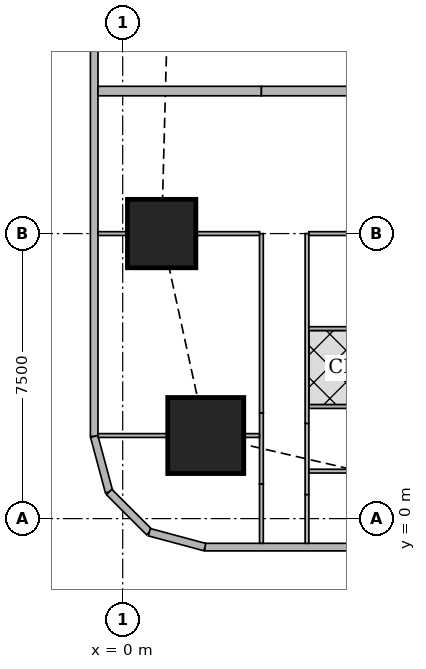
"""IFC4 building model, lengths in metres.
Left out: names, types, materials, properties, quantities, classifications, styles, units other than length and angle.
Written with IfcOpenShell. Run it as: python <this file> out.ifc"""

import sys

from ifc_helpers import new_model, si_unit, direction, frame, frame_2d, origin, origin_2d, place, context, subcontext, project, spatial, rectangle, extrude, element, fill, save


model = new_model("IFC4")
c1 = context("Model", 3, precision=1e-05, world=origin(), true_north=direction((0.0, 1.0)))
c2 = subcontext(c1, "Body", "Model", "MODEL_VIEW")
j1 = project(units=[si_unit("LENGTHUNIT", "METRE"), si_unit("PLANEANGLEUNIT", "RADIAN")], contexts=[c1])
p1 = place(None, origin())
s1 = spatial("IfcSite", under=j1, at=p1, CompositionType="ELEMENT")
p2 = place(p1, origin())
s2 = spatial("IfcBuilding", under=s1, at=p2, CompositionType="ELEMENT")
p3 = place(p2, frame((0.0, 0.0, 158.3)))
s3 = spatial("IfcBuildingStorey", under=s2, at=p3, CompositionType="ELEMENT", Elevation=158.3)
p4 = place(p3, frame((2.186, 2.186, 0.0), z_axis=(0.0, 0.0, 1.0), x_axis=(1.0, 0.0, 0.0)))
e1 = element("IfcColumn", 1, at=p4, inside=s3, PredefinedType="COLUMN", context=c2, shape_type="SweptSolid", body=[
    extrude(rectangle(XDim=2.0, YDim=2.0, at=origin_2d()), origin(), (0.0, 0.0, 1.0), 3.75),
])
p5 = place(p3, frame((1.025, 7.5, 0.0), z_axis=(0.0, 0.0, 1.0), x_axis=(1.0, 0.0, 0.0)))
e2 = element("IfcColumn", 2, at=p5, inside=s3, PredefinedType="COLUMN", context=c2, shape_type="SweptSolid", body=[
    extrude(rectangle(XDim=1.8, YDim=1.8, at=origin_2d()), origin(), (0.0, 0.0, 1.0), 3.75),
])
p6 = place(p3, frame((2.163, -0.75, 0.0), z_axis=(0.0, 0.0, 1.0), x_axis=(1.0, 0.0, 0.0)))
e3 = element("IfcWall", 3, at=p6, inside=s3, PredefinedType="SOLIDWALL", context=c2, shape_type="SweptSolid", body=[
    extrude(rectangle(XDim=45.628, YDim=0.2, at=frame_2d((22.814, 0.0))), origin(), (0.0, 0.0, 1.0), 3.5),
])
p7 = place(p6, frame((9.537, 0.0, 0.9)))
e4 = element("IfcOpeningElement", 4, at=p7, cuts=e3, PredefinedType="OPENING", context=c2, shape_type="SweptSolid", body=[
    extrude(rectangle(XDim=1.8, YDim=1.5, at=frame_2d((0.9, 0.75))), frame((0.0, 0.11, 0.0), z_axis=(0.0, -1.0, 0.0), x_axis=(1.0, 0.0, 0.0)), (0.0, 0.0, 1.0), 0.22),
])
p8 = place(p6, frame((13.137, 0.0, 0.9)))
e5 = element("IfcOpeningElement", 5, at=p8, cuts=e3, PredefinedType="OPENING", context=c2, shape_type="SweptSolid", body=[
    extrude(rectangle(XDim=1.8, YDim=1.5, at=frame_2d((0.9, 0.75))), frame((0.0, 0.11, 0.0), z_axis=(0.0, -1.0, 0.0), x_axis=(1.0, 0.0, 0.0)), (0.0, 0.0, 1.0), 0.22),
])
p9 = place(p6, frame((16.737, 0.0, 0.9)))
e6 = element("IfcOpeningElement", 6, at=p9, cuts=e3, PredefinedType="OPENING", context=c2, shape_type="SweptSolid", body=[
    extrude(rectangle(XDim=1.8, YDim=1.5, at=frame_2d((0.9, 0.75))), frame((0.0, 0.11, 0.0), z_axis=(0.0, -1.0, 0.0), x_axis=(1.0, 0.0, 0.0)), (0.0, 0.0, 1.0), 0.22),
])
p10 = place(p6, frame((20.337, 0.0, 0.9)))
e7 = element("IfcOpeningElement", 7, at=p10, cuts=e3, PredefinedType="OPENING", context=c2, shape_type="SweptSolid", body=[
    extrude(rectangle(XDim=1.8, YDim=1.5, at=frame_2d((0.9, 0.75))), frame((0.0, 0.11, 0.0), z_axis=(0.0, -1.0, 0.0), x_axis=(1.0, 0.0, 0.0)), (0.0, 0.0, 1.0), 0.22),
])
p11 = place(p6, frame((23.937, 0.0, 0.9)))
e8 = element("IfcOpeningElement", 8, at=p11, cuts=e3, PredefinedType="OPENING", context=c2, shape_type="SweptSolid", body=[
    extrude(rectangle(XDim=1.8, YDim=1.5, at=frame_2d((0.9, 0.75))), frame((0.0, 0.11, 0.0), z_axis=(0.0, -1.0, 0.0), x_axis=(1.0, 0.0, 0.0)), (0.0, 0.0, 1.0), 0.22),
])
p12 = place(p6, frame((27.537, 0.0, 0.9)))
e9 = element("IfcOpeningElement", 9, at=p12, cuts=e3, PredefinedType="OPENING", context=c2, shape_type="SweptSolid", body=[
    extrude(rectangle(XDim=1.8, YDim=1.5, at=frame_2d((0.9, 0.75))), frame((0.0, 0.11, 0.0), z_axis=(0.0, -1.0, 0.0), x_axis=(1.0, 0.0, 0.0)), (0.0, 0.0, 1.0), 0.22),
])
p13 = place(p6, frame((31.137, 0.0, 0.9)))
e10 = element("IfcOpeningElement", 10, at=p13, cuts=e3, PredefinedType="OPENING", context=c2, shape_type="SweptSolid", body=[
    extrude(rectangle(XDim=1.8, YDim=1.5, at=frame_2d((0.9, 0.75))), frame((0.0, 0.11, 0.0), z_axis=(0.0, -1.0, 0.0), x_axis=(1.0, 0.0, 0.0)), (0.0, 0.0, 1.0), 0.22),
])
p14 = place(p6, frame((34.737, 0.0, 0.9)))
e11 = element("IfcOpeningElement", 11, at=p14, cuts=e3, PredefinedType="OPENING", context=c2, shape_type="SweptSolid", body=[
    extrude(rectangle(XDim=1.8, YDim=1.5, at=frame_2d((0.9, 0.75))), frame((0.0, 0.11, 0.0), z_axis=(0.0, -1.0, 0.0), x_axis=(1.0, 0.0, 0.0)), (0.0, 0.0, 1.0), 0.22),
])
p15 = place(p3, frame((-0.75, 42.837, 0.0), z_axis=(0.0, 0.0, 1.0), x_axis=(0.0, -1.0, 0.0)))
e12 = element("IfcWall", 12, at=p15, inside=s3, PredefinedType="SOLIDWALL", context=c2, shape_type="SweptSolid", body=[
    extrude(rectangle(XDim=40.674, YDim=0.2, at=frame_2d((20.337, 0.0))), origin(), (0.0, 0.0, 1.0), 3.5),
])
p16 = place(p15, frame((1.78, 0.0, 0.9)))
e13 = element("IfcOpeningElement", 13, at=p16, cuts=e12, PredefinedType="OPENING", context=c2, shape_type="SweptSolid", body=[
    extrude(rectangle(XDim=1.8, YDim=1.5, at=frame_2d((0.9, 0.75))), frame((0.0, 0.11, 0.0), z_axis=(0.0, -1.0, 0.0), x_axis=(1.0, 0.0, 0.0)), (0.0, 0.0, 1.0), 0.22),
])
p17 = place(p15, frame((6.312, 0.0, 0.9)))
e14 = element("IfcOpeningElement", 14, at=p17, cuts=e12, PredefinedType="OPENING", context=c2, shape_type="SweptSolid", body=[
    extrude(rectangle(XDim=1.8, YDim=1.5, at=frame_2d((0.9, 0.75))), frame((0.0, 0.11, 0.0), z_axis=(0.0, -1.0, 0.0), x_axis=(1.0, 0.0, 0.0)), (0.0, 0.0, 1.0), 0.22),
])
p18 = place(p15, frame((10.062, 0.0, 0.9)))
e15 = element("IfcOpeningElement", 15, at=p18, cuts=e12, PredefinedType="OPENING", context=c2, shape_type="SweptSolid", body=[
    extrude(rectangle(XDim=1.8, YDim=1.5, at=frame_2d((0.9, 0.75))), frame((0.0, 0.11, 0.0), z_axis=(0.0, -1.0, 0.0), x_axis=(1.0, 0.0, 0.0)), (0.0, 0.0, 1.0), 0.22),
])
p19 = place(p15, frame((13.812, 0.0, 0.9)))
e16 = element("IfcOpeningElement", 16, at=p19, cuts=e12, PredefinedType="OPENING", context=c2, shape_type="SweptSolid", body=[
    extrude(rectangle(XDim=1.8, YDim=1.5, at=frame_2d((0.9, 0.75))), frame((0.0, 0.11, 0.0), z_axis=(0.0, -1.0, 0.0), x_axis=(1.0, 0.0, 0.0)), (0.0, 0.0, 1.0), 0.22),
])
p20 = place(p15, frame((17.562, 0.0, 0.9)))
e17 = element("IfcOpeningElement", 17, at=p20, cuts=e12, PredefinedType="OPENING", context=c2, shape_type="SweptSolid", body=[
    extrude(rectangle(XDim=1.8, YDim=1.5, at=frame_2d((0.9, 0.75))), frame((0.0, 0.11, 0.0), z_axis=(0.0, -1.0, 0.0), x_axis=(1.0, 0.0, 0.0)), (0.0, 0.0, 1.0), 0.22),
])
p21 = place(p15, frame((21.312, 0.0, 0.9)))
e18 = element("IfcOpeningElement", 18, at=p21, cuts=e12, PredefinedType="OPENING", context=c2, shape_type="SweptSolid", body=[
    extrude(rectangle(XDim=1.8, YDim=1.5, at=frame_2d((0.9, 0.75))), frame((0.0, 0.11, 0.0), z_axis=(0.0, -1.0, 0.0), x_axis=(1.0, 0.0, 0.0)), (0.0, 0.0, 1.0), 0.22),
])
p22 = place(p15, frame((25.062, 0.0, 0.9)))
e19 = element("IfcOpeningElement", 19, at=p22, cuts=e12, PredefinedType="OPENING", context=c2, shape_type="SweptSolid", body=[
    extrude(rectangle(XDim=1.8, YDim=1.5, at=frame_2d((0.9, 0.75))), frame((0.0, 0.11, 0.0), z_axis=(0.0, -1.0, 0.0), x_axis=(1.0, 0.0, 0.0)), (0.0, 0.0, 1.0), 0.22),
])
p23 = place(p15, frame((28.812, 0.0, 0.9)))
e20 = element("IfcOpeningElement", 20, at=p23, cuts=e12, PredefinedType="OPENING", context=c2, shape_type="SweptSolid", body=[
    extrude(rectangle(XDim=1.8, YDim=1.5, at=frame_2d((0.9, 0.75))), frame((0.0, 0.11, 0.0), z_axis=(0.0, -1.0, 0.0), x_axis=(1.0, 0.0, 0.0)), (0.0, 0.0, 1.0), 0.22),
])
p24 = place(p15, frame((32.562, 0.0, 0.9)))
e21 = element("IfcOpeningElement", 21, at=p24, cuts=e12, PredefinedType="OPENING", context=c2, shape_type="SweptSolid", body=[
    extrude(rectangle(XDim=1.8, YDim=1.5, at=frame_2d((0.9, 0.75))), frame((0.0, 0.11, 0.0), z_axis=(0.0, -1.0, 0.0), x_axis=(1.0, 0.0, 0.0)), (0.0, 0.0, 1.0), 0.22),
])
p25 = place(p15, frame((37.094, 0.0, 0.9)))
e22 = element("IfcOpeningElement", 22, at=p25, cuts=e12, PredefinedType="OPENING", context=c2, shape_type="SweptSolid", body=[
    extrude(rectangle(XDim=1.8, YDim=1.5, at=frame_2d((0.9, 0.75))), frame((0.0, 0.11, 0.0), z_axis=(0.0, -1.0, 0.0), x_axis=(1.0, 0.0, 0.0)), (0.0, 0.0, 1.0), 0.22),
])
p26 = place(p3, frame((-0.75, 2.163, 0.0), z_axis=(0.0, 0.0, 1.0), x_axis=(0.259168954497, -0.965832000415, 0.0)))
e23 = element("IfcWall", 23, at=p26, inside=s3, PredefinedType="SOLIDWALL", context=c2, shape_type="SweptSolid", body=[
    extrude(rectangle(XDim=1.513, YDim=0.2, at=frame_2d((0.756, 0.0))), origin(), (0.0, 0.0, 1.0), 3.5),
])
p27 = place(p3, frame((-0.358, 0.702, 0.0), z_axis=(0.0, 0.0, 1.0), x_axis=(0.707106781187, -0.707106781187, 0.0)))
e24 = element("IfcWall", 24, at=p27, inside=s3, PredefinedType="SOLIDWALL", context=c2, shape_type="SweptSolid", body=[
    extrude(rectangle(XDim=1.499, YDim=0.2, at=frame_2d((0.75, 0.0))), origin(), (0.0, 0.0, 1.0), 3.5),
])
p28 = place(p3, frame((0.702, -0.358, 0.0), z_axis=(0.0, 0.0, 1.0), x_axis=(0.965832000415, -0.259168954497, 0.0)))
e25 = element("IfcWall", 25, at=p28, inside=s3, PredefinedType="SOLIDWALL", context=c2, shape_type="SweptSolid", body=[
    extrude(rectangle(XDim=1.513, YDim=0.2, at=frame_2d((0.756, 0.0))), origin(), (0.0, 0.0, 1.0), 3.5),
])
p29 = place(p3, frame((3.65, -0.65, 0.0), z_axis=(0.0, 0.0, 1.0), x_axis=(0.0, 1.0, 0.0)))
e26 = element("IfcWall", 26, at=p29, inside=s3, PredefinedType="PARTITIONING", context=c2, shape_type="SweptSolid", body=[
    extrude(rectangle(XDim=1.562, YDim=0.1, at=frame_2d((0.781, 0.0))), origin(), (0.0, 0.0, 1.0), 3.5),
])
p30 = place(p3, frame((3.65, 0.912, 0.0), z_axis=(0.0, 0.0, 1.0), x_axis=(0.0, 1.0, 0.0)))
e27 = element("IfcWall", 27, at=p30, inside=s3, PredefinedType="PARTITIONING", context=c2, shape_type="SweptSolid", body=[
    extrude(rectangle(XDim=1.87, YDim=0.1, at=frame_2d((0.935, 0.0))), origin(), (0.0, 0.0, 1.0), 2.1),
])
p31 = place(p3, frame((3.65, 2.782, 0.0), z_axis=(0.0, 0.0, 1.0), x_axis=(0.0, 1.0, 0.0)))
e28 = element("IfcWall", 28, at=p31, inside=s3, PredefinedType="PARTITIONING", context=c2, shape_type="SweptSolid", body=[
    extrude(rectangle(XDim=4.718, YDim=0.1, at=frame_2d((2.359, 0.0))), origin(), (0.0, 0.0, 1.0), 3.5),
])
p32 = place(p31, frame((3.618, 0.0, 0.0)))
e29 = element("IfcOpeningElement", 29, at=p32, cuts=e28, PredefinedType="OPENING", context=c2, shape_type="SweptSolid", body=[
    extrude(rectangle(XDim=0.9, YDim=2.1, at=frame_2d((0.45, 1.05))), frame((0.0, 0.06, 0.0), z_axis=(0.0, -1.0, 0.0), x_axis=(1.0, 0.0, 0.0)), (0.0, 0.0, 1.0), 0.12),
])
p33 = place(p3, frame((4.85, -0.65, 0.0), z_axis=(0.0, 0.0, 1.0), x_axis=(0.0, 1.0, 0.0)))
e30 = element("IfcWall", 30, at=p33, inside=s3, PredefinedType="PARTITIONING", context=c2, shape_type="SweptSolid", body=[
    extrude(rectangle(XDim=1.284, YDim=0.1, at=frame_2d((0.642, 0.0))), origin(), (0.0, 0.0, 1.0), 3.5),
])
p34 = place(p33, frame((0.234, 0.0, 0.0)))
e31 = element("IfcOpeningElement", 31, at=p34, cuts=e30, PredefinedType="OPENING", context=c2, shape_type="SweptSolid", body=[
    extrude(rectangle(XDim=0.9, YDim=2.1, at=frame_2d((0.45, 1.05))), frame((0.0, 0.06, 0.0), z_axis=(0.0, -1.0, 0.0), x_axis=(1.0, 0.0, 0.0)), (0.0, 0.0, 1.0), 0.12),
])
p35 = place(p3, frame((4.85, 0.634, 0.0), z_axis=(0.0, 0.0, 1.0), x_axis=(0.0, 1.0, 0.0)))
e32 = element("IfcWall", 32, at=p35, inside=s3, PredefinedType="PARTITIONING", context=c2, shape_type="SweptSolid", body=[
    extrude(rectangle(XDim=1.871, YDim=0.1, at=frame_2d((0.936, 0.0))), origin(), (0.0, 0.0, 1.0), 2.1),
])
p36 = place(p3, frame((4.85, 2.505, 0.0), z_axis=(0.0, 0.0, 1.0), x_axis=(0.0, 1.0, 0.0)))
e33 = element("IfcWall", 33, at=p36, inside=s3, PredefinedType="PARTITIONING", context=c2, shape_type="SweptSolid", body=[
    extrude(rectangle(XDim=4.995, YDim=0.1, at=frame_2d((2.498, 0.0))), origin(), (0.0, 0.0, 1.0), 3.5),
])
p37 = place(p36, frame((3.294, 0.0, 0.0)))
e34 = element("IfcOpeningElement", 34, at=p37, cuts=e33, PredefinedType="OPENING", context=c2, shape_type="SweptSolid", body=[
    extrude(rectangle(XDim=0.9, YDim=2.1, at=frame_2d((0.45, 1.05))), frame((0.0, 0.06, 0.0), z_axis=(0.0, -1.0, 0.0), x_axis=(1.0, 0.0, 0.0)), (0.0, 0.0, 1.0), 0.12),
])
p38 = place(p36, frame((1.019, 0.0, 0.0)))
e35 = element("IfcOpeningElement", 35, at=p38, cuts=e33, PredefinedType="OPENING", context=c2, shape_type="SweptSolid", body=[
    extrude(rectangle(XDim=0.9, YDim=2.1, at=frame_2d((0.45, 1.05))), frame((0.0, 0.06, 0.0), z_axis=(0.0, -1.0, 0.0), x_axis=(1.0, 0.0, 0.0)), (0.0, 0.0, 1.0), 0.12),
])
p39 = place(p3, frame((-0.65, 2.186, 0.0), z_axis=(0.0, 0.0, 1.0), x_axis=(1.0, 0.0, 0.0)))
e36 = element("IfcWall", 36, at=p39, inside=s3, PredefinedType="PARTITIONING", context=c2, shape_type="SweptSolid", body=[
    extrude(rectangle(XDim=1.835, YDim=0.1, at=frame_2d((0.917, 0.0))), origin(), (0.0, 0.0, 1.0), 3.5),
])
p40 = place(p3, frame((3.187, 2.186, 0.0), z_axis=(0.0, 0.0, 1.0), x_axis=(1.0, 0.0, 0.0)))
e37 = element("IfcWall", 37, at=p40, inside=s3, PredefinedType="PARTITIONING", context=c2, shape_type="SweptSolid", body=[
    extrude(rectangle(XDim=0.413, YDim=0.1, at=frame_2d((0.207, 0.0))), origin(), (0.0, 0.0, 1.0), 2.1),
])
p41 = place(p3, frame((-0.65, 7.5, 0.0), z_axis=(0.0, 0.0, 1.0), x_axis=(1.0, 0.0, 0.0)))
e38 = element("IfcWall", 38, at=p41, inside=s3, PredefinedType="PARTITIONING", context=c2, shape_type="SweptSolid", body=[
    extrude(rectangle(XDim=0.774, YDim=0.1, at=frame_2d((0.387, 0.0))), origin(), (0.0, 0.0, 1.0), 3.5),
])
p42 = place(p3, frame((1.926, 7.5, 0.0), z_axis=(0.0, 0.0, 1.0), x_axis=(1.0, 0.0, 0.0)))
e39 = element("IfcWall", 39, at=p42, inside=s3, PredefinedType="PARTITIONING", context=c2, shape_type="SweptSolid", body=[
    extrude(rectangle(XDim=1.674, YDim=0.1, at=frame_2d((0.837, 0.0))), origin(), (0.0, 0.0, 1.0), 2.1),
])
p43 = place(p3, frame((4.9, 4.999, 0.0), z_axis=(0.0, 0.0, 1.0), x_axis=(1.0, 0.0, 0.0)))
e40 = element("IfcWall", 40, at=p43, inside=s3, PredefinedType="PARTITIONING", context=c2, shape_type="SweptSolid", body=[
    extrude(rectangle(XDim=3.525, YDim=0.1, at=frame_2d((1.763, 0.0))), origin(), (0.0, 0.0, 1.0), 3.5),
])
p44 = place(p3, frame((4.9, 7.5, 0.0), z_axis=(0.0, 0.0, 1.0), x_axis=(1.0, 0.0, 0.0)))
e41 = element("IfcWall", 41, at=p44, inside=s3, PredefinedType="PARTITIONING", context=c2, shape_type="SweptSolid", body=[
    extrude(rectangle(XDim=1.549, YDim=0.1, at=frame_2d((0.774, 0.0))), origin(), (0.0, 0.0, 1.0), 3.5),
])
p45 = place(p3, frame((4.9, 1.249, 0.0), z_axis=(0.0, 0.0, 1.0), x_axis=(1.0, 0.0, 0.0)))
e42 = element("IfcWall", 42, at=p45, inside=s3, PredefinedType="PARTITIONING", context=c2, shape_type="SweptSolid", body=[
    extrude(rectangle(XDim=1.399, YDim=0.1, at=frame_2d((0.7, 0.0))), origin(), (0.0, 0.0, 1.0), 2.1),
])
p46 = place(p3, frame((4.9, 2.949, 0.0), z_axis=(0.0, 0.0, 1.0), x_axis=(1.0, 0.0, 0.0)))
e43 = element("IfcWall", 43, at=p46, inside=s3, PredefinedType="PARTITIONING", context=c2, shape_type="SweptSolid", body=[
    extrude(rectangle(XDim=3.525, YDim=0.1, at=frame_2d((1.763, 0.0))), origin(), (0.0, 0.0, 1.0), 3.5),
])
p47 = place(p46, frame((0.45, 0.0, 0.0)))
e44 = element("IfcOpeningElement", 44, at=p47, cuts=e43, PredefinedType="OPENING", context=c2, shape_type="SweptSolid", body=[
    extrude(rectangle(XDim=0.9, YDim=2.1, at=frame_2d((0.45, 1.05))), frame((0.0, 0.06, 0.0), z_axis=(0.0, -1.0, 0.0), x_axis=(1.0, 0.0, 0.0)), (0.0, 0.0, 1.0), 0.12),
])
p48 = place(p3, frame((-0.65, 11.25, 0.0), z_axis=(0.0, 0.0, 1.0), x_axis=(1.0, 0.0, 0.0)))
e45 = element("IfcWall", 45, at=p48, inside=s3, PredefinedType="SOLIDWALL", context=c2, shape_type="SweptSolid", body=[
    extrude(rectangle(XDim=4.3, YDim=0.25, at=frame_2d((2.15, 0.0))), origin(), (0.0, 0.0, 1.0), 2.1),
])
p49 = place(p3, frame((3.65, 11.25, 0.0), z_axis=(0.0, 0.0, 1.0), x_axis=(1.0, 0.0, 0.0)))
e46 = element("IfcWall", 46, at=p49, inside=s3, PredefinedType="SOLIDWALL", context=c2, shape_type="SweptSolid", body=[
    extrude(rectangle(XDim=4.775, YDim=0.25, at=frame_2d((2.388, 0.0))), origin(), (0.0, 0.0, 1.0), 3.5),
])
p50 = place(p23, origin())
e47 = element("IfcWindow", 47, at=p50, inside=s3, PartitioningType="SINGLE_PANEL", PredefinedType="WINDOW", context=c2, shape_type="SweptSolid", body=[
    extrude(rectangle(XDim=1.8, YDim=1.5, at=frame_2d((0.9, 0.75))), frame((0.0, 0.03, 0.0), z_axis=(0.0, -1.0, 0.0), x_axis=(1.0, 0.0, 0.0)), (0.0, 0.0, 1.0), 0.06),
])
fill(e20, e47)
p51 = place(p24, origin())
e48 = element("IfcWindow", 48, at=p51, inside=s3, PartitioningType="SINGLE_PANEL", PredefinedType="WINDOW", context=c2, shape_type="SweptSolid", body=[
    extrude(rectangle(XDim=1.8, YDim=1.5, at=frame_2d((0.9, 0.75))), frame((0.0, 0.03, 0.0), z_axis=(0.0, -1.0, 0.0), x_axis=(1.0, 0.0, 0.0)), (0.0, 0.0, 1.0), 0.06),
])
fill(e21, e48)
p52 = place(p25, origin())
e49 = element("IfcWindow", 49, at=p52, inside=s3, PartitioningType="SINGLE_PANEL", PredefinedType="WINDOW", context=c2, shape_type="SweptSolid", body=[
    extrude(rectangle(XDim=1.8, YDim=1.5, at=frame_2d((0.9, 0.75))), frame((0.0, 0.03, 0.0), z_axis=(0.0, -1.0, 0.0), x_axis=(1.0, 0.0, 0.0)), (0.0, 0.0, 1.0), 0.06),
])
fill(e22, e49)
p53 = place(p32, origin())
e50 = element("IfcDoor", 50, at=p53, inside=s3, OperationType="SINGLE_SWING_RIGHT", PredefinedType="DOOR", context=c2, shape_type="SweptSolid", body=[
    extrude(rectangle(XDim=0.9, YDim=2.1, at=frame_2d((0.45, 1.05))), frame((0.0, 0.025, 0.0), z_axis=(0.0, -1.0, 0.0), x_axis=(1.0, 0.0, 0.0)), (0.0, 0.0, 1.0), 0.05),
])
fill(e29, e50)
p54 = place(p37, origin())
e51 = element("IfcDoor", 51, at=p54, inside=s3, OperationType="SINGLE_SWING_LEFT", PredefinedType="DOOR", context=c2, shape_type="SweptSolid", body=[
    extrude(rectangle(XDim=0.9, YDim=2.1, at=frame_2d((0.45, 1.05))), frame((0.0, 0.025, 0.0), z_axis=(0.0, -1.0, 0.0), x_axis=(1.0, 0.0, 0.0)), (0.0, 0.0, 1.0), 0.05),
])
fill(e34, e51)
p55 = place(p38, origin())
e52 = element("IfcDoor", 52, at=p55, inside=s3, OperationType="SINGLE_SWING_LEFT", PredefinedType="DOOR", context=c2, shape_type="SweptSolid", body=[
    extrude(rectangle(XDim=0.9, YDim=2.1, at=frame_2d((0.45, 1.05))), frame((0.0, 0.025, 0.0), z_axis=(0.0, -1.0, 0.0), x_axis=(1.0, 0.0, 0.0)), (0.0, 0.0, 1.0), 0.05),
])
fill(e35, e52)
p56 = place(p34, origin())
e53 = element("IfcDoor", 53, at=p56, inside=s3, OperationType="SINGLE_SWING_LEFT", PredefinedType="DOOR", context=c2, shape_type="SweptSolid", body=[
    extrude(rectangle(XDim=0.9, YDim=2.1, at=frame_2d((0.45, 1.05))), frame((0.0, 0.025, 0.0), z_axis=(0.0, -1.0, 0.0), x_axis=(1.0, 0.0, 0.0)), (0.0, 0.0, 1.0), 0.05),
])
fill(e31, e53)
p57 = place(p47, origin())
e54 = element("IfcDoor", 54, at=p57, inside=s3, OperationType="SINGLE_SWING_RIGHT", PredefinedType="DOOR", context=c2, shape_type="SweptSolid", body=[
    extrude(rectangle(XDim=0.9, YDim=2.1, at=frame_2d((0.45, 1.05))), frame((0.0, 0.025, 0.0), z_axis=(0.0, -1.0, 0.0), x_axis=(1.0, 0.0, 0.0)), (0.0, 0.0, 1.0), 0.05),
])
fill(e44, e54)
save(model, sys.argv[1])
